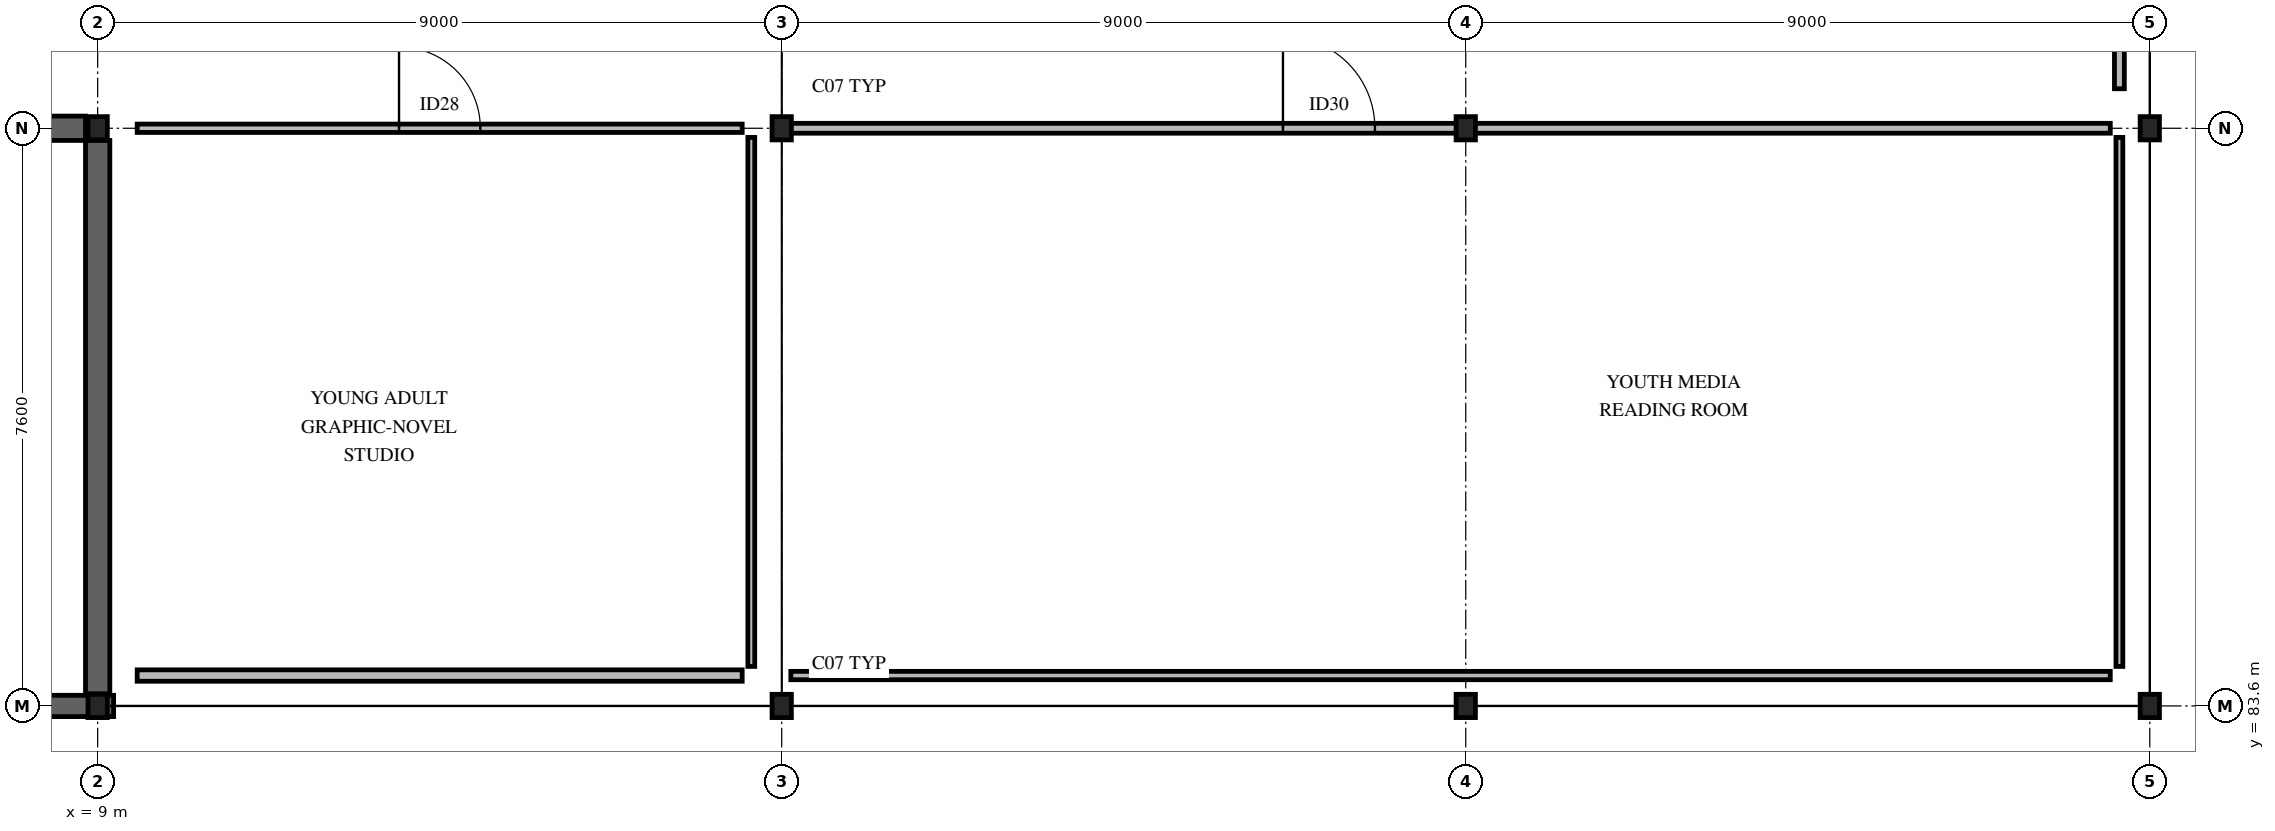
"""IFC4 building model, lengths in metres.
Left out: names, types, materials, properties, quantities, classifications, styles, units other than length and angle.
Written with IfcOpenShell. Run it as: python <this file> out.ifc"""

import sys

from ifc_helpers import new_model, si_unit, direction, frame, frame_2d, origin, origin_2d, place, context, subcontext, project, spatial, rectangle, i_section, extrude, element, fill, save


model = new_model("IFC4")
c1 = context("Model", 3, precision=1e-05, world=origin(), true_north=direction((0.0, 1.0)))
c2 = subcontext(c1, "Body", "Model", "MODEL_VIEW")
j1 = project(units=[si_unit("LENGTHUNIT", "METRE"), si_unit("PLANEANGLEUNIT", "RADIAN")], contexts=[c1])
p1 = place(None, origin())
s1 = spatial("IfcSite", under=j1, at=p1, CompositionType="ELEMENT")
p2 = place(p1, origin())
s2 = spatial("IfcBuilding", under=s1, at=p2, CompositionType="ELEMENT")
p3 = place(p2, frame((0.0, 0.0, 5.04)))
s3 = spatial("IfcBuildingStorey", under=s2, at=p3, CompositionType="ELEMENT", Elevation=5.04)
for number, where, z_axis, x_axis in (
    (1, (9.0, 83.6, 0.0), (0.0, 0.0, 1.0), (1.0, 0.0, 0.0)),
    (2, (9.0, 91.2, 0.0), (0.0, 0.0, 1.0), (1.0, 0.0, 0.0)),
    (3, (18.0, 83.6, 0.0), (0.0, 0.0, 1.0), (1.0, 0.0, 0.0)),
    (4, (18.0, 91.2, 0.0), (0.0, 0.0, 1.0), (1.0, 0.0, 0.0)),
    (5, (27.0, 83.6, 0.0), (0.0, 0.0, 1.0), (1.0, 0.0, 0.0)),
    (6, (27.0, 91.2, 0.0), (0.0, 0.0, 1.0), (1.0, 0.0, 0.0)),
    (7, (36.0, 83.6, 0.0), (0.0, 0.0, 1.0), (1.0, 0.0, 0.0)),
    (8, (36.0, 91.2, 0.0), (0.0, 0.0, 1.0), (1.0, 0.0, 0.0)),
):
    element("IfcColumn", number, at=place(p3, frame(where, z_axis=z_axis, x_axis=x_axis)), inside=s3, PredefinedType="COLUMN", context=c2, shape_type="SweptSolid", body=[
        extrude(i_section(OverallWidth=0.254, OverallDepth=0.306, WebThickness=0.009, FlangeThickness=0.015, FilletRadius=0.015, at=origin_2d()), origin(), (0.0, 0.0, 1.0), 4.32),
    ])
p4 = place(p3, frame((0.0, 83.6, 0.0), z_axis=(0.0, 0.0, 1.0), x_axis=(1.0, 0.0, 0.0)))
e9 = element("IfcWall", 9, at=p4, inside=s3, PredefinedType="SOLIDWALL", context=c2, shape_type="SweptSolid", body=[
    extrude(rectangle(XDim=9.21, YDim=0.28, at=frame_2d((4.605, 0.0))), origin(), (0.0, 0.0, 1.0), 4.08),
])
p5 = place(p3, frame((0.16, 91.2, 0.0), z_axis=(0.0, 0.0, 1.0), x_axis=(1.0, 0.0, 0.0)))
e10 = element("IfcWall", 10, at=p5, inside=s3, PredefinedType="SHEAR", context=c2, shape_type="SweptSolid", body=[
    extrude(rectangle(XDim=8.68, YDim=0.32, at=frame_2d((4.34, 0.0))), origin(), (0.0, 0.0, 1.0), 4.04),
])
p6 = place(p5, frame((2.2, 0.0, 0.0)))
e11 = element("IfcOpeningElement", 11, at=p6, cuts=e10, PredefinedType="OPENING", context=c2, shape_type="SweptSolid", body=[
    extrude(rectangle(XDim=1.0, YDim=2.15, at=frame_2d((0.5, 1.075))), frame((0.0, 0.17, 0.0), z_axis=(0.0, -1.0, 0.0), x_axis=(1.0, 0.0, 0.0)), (0.0, 0.0, 1.0), 0.34),
])
p7 = place(p3, frame((9.0, 83.76, 0.0), z_axis=(0.0, 0.0, 1.0), x_axis=(0.0, 1.0, 0.0)))
e12 = element("IfcWall", 12, at=p7, inside=s3, PredefinedType="SHEAR", context=c2, shape_type="SweptSolid", body=[
    extrude(rectangle(XDim=7.28, YDim=0.32, at=frame_2d((3.64, 0.0))), origin(), (0.0, 0.0, 1.0), 4.04),
])
p8 = place(p3, frame((9.52, 91.2, 0.0), z_axis=(0.0, 0.0, 1.0), x_axis=(1.0, 0.0, 0.0)))
e13 = element("IfcWall", 13, at=p8, inside=s3, PredefinedType="PARTITIONING", context=c2, shape_type="SweptSolid", body=[
    extrude(rectangle(XDim=7.96, YDim=0.11, at=frame_2d((3.98, 0.0))), origin(), (0.0, 0.0, 1.0), 4.04),
])
p9 = place(p8, frame((3.445, 0.0, 0.0)))
e14 = element("IfcOpeningElement", 14, at=p9, cuts=e13, PredefinedType="OPENING", context=c2, shape_type="SweptSolid", body=[
    extrude(rectangle(XDim=1.07, YDim=2.15, at=frame_2d((0.535, 1.075))), frame((0.0, 0.065, 0.0), z_axis=(0.0, -1.0, 0.0), x_axis=(1.0, 0.0, 0.0)), (0.0, 0.0, 1.0), 0.13),
])
p10 = place(p3, frame((17.6, 84.12, 0.0), z_axis=(0.0, 0.0, 1.0), x_axis=(0.0, 1.0, 0.0)))
e15 = element("IfcWall", 15, at=p10, inside=s3, PredefinedType="PARTITIONING", context=c2, shape_type="SweptSolid", body=[
    extrude(rectangle(XDim=6.96, YDim=0.09, at=frame_2d((3.48, 0.0))), origin(), (0.0, 0.0, 1.0), 4.04),
])
p11 = place(p3, frame((9.52, 84.0, 0.0), z_axis=(0.0, 0.0, 1.0), x_axis=(1.0, 0.0, 0.0)))
e16 = element("IfcWall", 16, at=p11, inside=s3, PredefinedType="PARTITIONING", context=c2, shape_type="SweptSolid", body=[
    extrude(rectangle(XDim=7.96, YDim=0.15, at=frame_2d((3.98, 0.0))), origin(), (0.0, 0.0, 1.0), 4.04),
])
p12 = place(p3, frame((18.12, 91.2, 0.0), z_axis=(0.0, 0.0, 1.0), x_axis=(1.0, 0.0, 0.0)))
e17 = element("IfcWall", 17, at=p12, inside=s3, PredefinedType="PARTITIONING", context=c2, shape_type="SweptSolid", body=[
    extrude(rectangle(XDim=17.36, YDim=0.13, at=frame_2d((8.68, 0.0))), origin(), (0.0, 0.0, 1.0), 4.04),
])
p13 = place(p12, frame((6.475, 0.0, 0.0)))
e18 = element("IfcOpeningElement", 18, at=p13, cuts=e17, PredefinedType="OPENING", context=c2, shape_type="SweptSolid", body=[
    extrude(rectangle(XDim=1.21, YDim=2.15, at=frame_2d((0.605, 1.075))), frame((0.0, 0.075, 0.0), z_axis=(0.0, -1.0, 0.0), x_axis=(1.0, 0.0, 0.0)), (0.0, 0.0, 1.0), 0.15),
])
p14 = place(p3, frame((18.12, 84.0, 0.0), z_axis=(0.0, 0.0, 1.0), x_axis=(1.0, 0.0, 0.0)))
e19 = element("IfcWall", 19, at=p14, inside=s3, PredefinedType="PARTITIONING", context=c2, shape_type="SweptSolid", body=[
    extrude(rectangle(XDim=17.36, YDim=0.11, at=frame_2d((8.68, 0.0))), origin(), (0.0, 0.0, 1.0), 4.04),
])
p15 = place(p3, frame((35.6, 84.12, 0.0), z_axis=(0.0, 0.0, 1.0), x_axis=(0.0, 1.0, 0.0)))
e20 = element("IfcWall", 20, at=p15, inside=s3, PredefinedType="PARTITIONING", context=c2, shape_type="SweptSolid", body=[
    extrude(rectangle(XDim=6.96, YDim=0.09, at=frame_2d((3.48, 0.0))), origin(), (0.0, 0.0, 1.0), 4.04),
])
p16 = place(p3, frame((35.6, 91.72, 0.0), z_axis=(0.0, 0.0, 1.0), x_axis=(0.0, 1.0, 0.0)))
e21 = element("IfcWall", 21, at=p16, inside=s3, PredefinedType="PARTITIONING", context=c2, shape_type="SweptSolid", body=[
    extrude(rectangle(XDim=2.56, YDim=0.13, at=frame_2d((1.28, 0.0))), origin(), (0.0, 0.0, 1.0), 4.04),
])
p17 = place(p9, origin())
e22 = element("IfcDoor", 22, at=p17, inside=s3, OperationType="SINGLE_SWING_LEFT", PredefinedType="DOOR", context=c2, shape_type="SweptSolid", body=[
    extrude(rectangle(XDim=1.07, YDim=2.15, at=frame_2d((0.535, 1.075))), frame((0.0, 0.025, 0.0), z_axis=(0.0, -1.0, 0.0), x_axis=(1.0, 0.0, 0.0)), (0.0, 0.0, 1.0), 0.05),
])
fill(e14, e22)
p18 = place(p13, origin())
e23 = element("IfcDoor", 23, at=p18, inside=s3, OperationType="SINGLE_SWING_LEFT", PredefinedType="DOOR", context=c2, shape_type="SweptSolid", body=[
    extrude(rectangle(XDim=1.21, YDim=2.15, at=frame_2d((0.605, 1.075))), frame((0.0, 0.025, 0.0), z_axis=(0.0, -1.0, 0.0), x_axis=(1.0, 0.0, 0.0)), (0.0, 0.0, 1.0), 0.05),
])
fill(e18, e23)
save(model, sys.argv[1])
